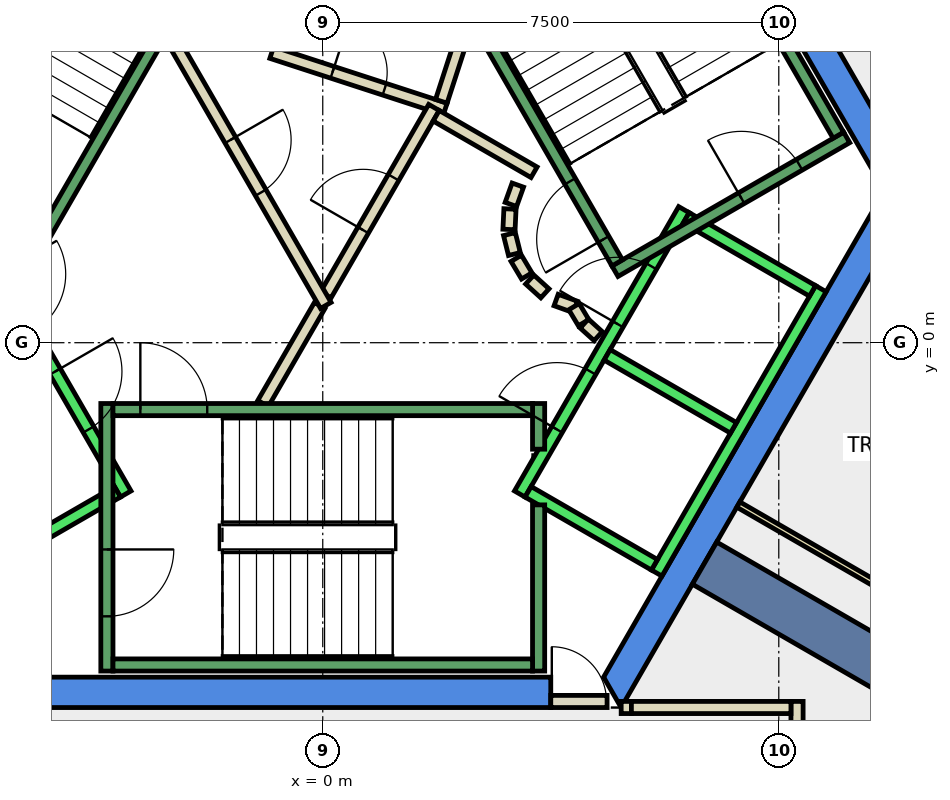
"""IFC4 building model, lengths in metres.
Left out: names, types, materials, properties, quantities, classifications, styles, units other than length and angle.
Written with IfcOpenShell. Run it as: python <this file> out.ifc"""

import sys

from ifc_helpers import new_model, si_unit, direction, frame, frame_2d, origin, place, context, subcontext, project, spatial, polyline, rectangle, outline, extrude, element, fill, save


model = new_model("IFC4")
c1 = context("Model", 3, precision=1e-05, world=origin(), true_north=direction((0.0, 1.0)))
c2 = subcontext(c1, "Body", "Model", "MODEL_VIEW")
j1 = project(units=[si_unit("LENGTHUNIT", "METRE"), si_unit("PLANEANGLEUNIT", "RADIAN")], contexts=[c1])
p1 = place(None, origin())
s1 = spatial("IfcSite", under=j1, at=p1, CompositionType="ELEMENT")
p2 = place(p1, origin())
s2 = spatial("IfcBuilding", under=s1, at=p2, CompositionType="ELEMENT")
p3 = place(p2, frame((0.0, 0.0, 297.2)))
s3 = spatial("IfcBuildingStorey", under=s2, at=p3, CompositionType="ELEMENT", Elevation=297.2)
p4 = place(p3, frame((0.0, 0.0, -0.34)))
e1 = element("IfcWall", 1, at=p4, inside=s3, PredefinedType="SHEAR", context=c2, shape_type="SweptSolid", body=[
    extrude(outline(polyline([(5.486, 9.998), (5.053, 9.748), (9.238, 2.5), (9.815, 2.5), (5.486, 9.998)])), origin(), (0.0, 0.0, 1.0), 3.6),
])
p5 = place(p3, frame((0.0, 0.0, -0.34)))
e2 = element("IfcWall", 2, at=p5, inside=s3, PredefinedType="SHEAR", context=c2, shape_type="SweptSolid", body=[
    extrude(outline(polyline([(3.75, -6.0), (3.75, -5.5), (-4.619, -5.5), (-4.907, -6.0), (3.75, -6.0)])), origin(), (0.0, 0.0, 1.0), 3.6),
])
p6 = place(p3, frame((0.0, 0.0, -0.34)))
e3 = element("IfcWall", 3, at=p6, inside=s3, PredefinedType="SHEAR", context=c2, shape_type="SweptSolid", body=[
    extrude(outline(polyline([(4.907, -6.0), (9.815, 2.5), (9.238, 2.5), (4.619, -5.5), (4.907, -6.0)])), origin(), (0.0, 0.0, 1.0), 3.6),
])
p7 = place(p3, frame((6.279, -3.625, -0.34), z_axis=(0.0, 0.0, 1.0), x_axis=(0.866017533419, -0.500013631625, 0.0)))
e4 = element("IfcWall", 4, at=p7, inside=s3, PredefinedType="SHEAR", context=c2, shape_type="SweptSolid", body=[
    extrude(rectangle(XDim=9.0, YDim=0.8, at=frame_2d((4.5, 0.0))), origin(), (0.0, 0.0, 1.0), 3.6),
])
p8 = place(p3, frame((-0.839, 4.771, 0.0), z_axis=(0.0, 0.0, 1.0), x_axis=(0.950961084355, -0.309310549515, 0.0)))
e5 = element("IfcWall", 5, at=p8, inside=s3, PredefinedType="PARTITIONING", context=c2, shape_type="SweptSolid", body=[
    extrude(rectangle(XDim=3.0, YDim=0.2, at=frame_2d((1.5, 0.0))), origin(), (0.0, 0.0, 1.0), 3.26),
])
p9 = place(p8, frame((1.05, 0.0, 0.0)))
e6 = element("IfcOpeningElement", 6, at=p9, cuts=e5, PredefinedType="OPENING", context=c2, shape_type="SweptSolid", body=[
    extrude(rectangle(XDim=0.9, YDim=2.1, at=frame_2d((0.45, 1.05))), frame((0.0, 0.11, 0.0), z_axis=(0.0, -1.0, 0.0), x_axis=(1.0, 0.0, 0.0)), (0.0, 0.0, 1.0), 0.22),
])
p10 = place(p3, frame((1.95, 3.97, 0.0), z_axis=(0.0, 0.0, 1.0), x_axis=(0.308583003896, 0.951197418892, 0.0)))
e7 = element("IfcWall", 7, at=p10, inside=s3, PredefinedType="PARTITIONING", context=c2, shape_type="SweptSolid", body=[
    extrude(rectangle(XDim=1.449, YDim=0.2, at=frame_2d((0.724, 0.0))), origin(), (0.0, 0.0, 1.0), 3.26),
])
p11 = place(p3, frame((-0.982, -1.0, 0.0), z_axis=(0.0, 0.0, 1.0), x_axis=(0.50024047865, 0.865886518847, 0.0)))
e8 = element("IfcWall", 8, at=p11, inside=s3, PredefinedType="PARTITIONING", context=c2, shape_type="SweptSolid", body=[
    extrude(rectangle(XDim=1.863, YDim=0.2, at=frame_2d((0.931, 0.0))), origin(), (0.0, 0.0, 1.0), 3.26),
])
p12 = place(p3, frame((0.05, 0.787, 0.0), z_axis=(0.0, 0.0, 1.0), x_axis=(0.499954076797, 0.866051915934, 0.0)))
e9 = element("IfcWall", 9, at=p12, inside=s3, PredefinedType="PARTITIONING", context=c2, shape_type="SweptSolid", body=[
    extrude(rectangle(XDim=3.558, YDim=0.2, at=frame_2d((1.779, 0.0))), origin(), (0.0, 0.0, 1.0), 3.26),
])
p13 = place(p12, frame((1.229, 0.0, 0.0)))
e10 = element("IfcOpeningElement", 10, at=p13, cuts=e9, PredefinedType="OPENING", context=c2, shape_type="SweptSolid", body=[
    extrude(rectangle(XDim=1.0, YDim=2.1, at=frame_2d((0.5, 1.05))), frame((0.0, 0.11, 0.0), z_axis=(0.0, -1.0, 0.0), x_axis=(1.0, 0.0, 0.0)), (0.0, 0.0, 1.0), 0.22),
])
p14 = place(p3, frame((1.866, 3.732, 0.0), z_axis=(0.0, 0.0, 1.0), x_axis=(0.866043361281, -0.499968895414, 0.0)))
e11 = element("IfcWall", 11, at=p14, inside=s3, PredefinedType="PARTITIONING", context=c2, shape_type="SweptSolid", body=[
    extrude(rectangle(XDim=1.858, YDim=0.2, at=frame_2d((0.929, 0.0))), origin(), (0.0, 0.0, 1.0), 3.26),
])
p15 = place(p3, frame((3.208, 2.592, 0.0), z_axis=(0.0, 0.0, 1.0), x_axis=(-0.337388820924, -0.941365382578, 0.0)))
e12 = element("IfcWall", 12, at=p15, inside=s3, PredefinedType="PARTITIONING", context=c2, shape_type="SweptSolid", body=[
    extrude(rectangle(XDim=0.338, YDim=0.2, at=frame_2d((0.169, 0.0))), origin(), (0.0, 0.0, 1.0), 3.26),
])
p16 = place(p3, frame((3.079, 2.199, 0.0), z_axis=(0.0, 0.0, 1.0), x_axis=(-0.047771483479, -0.998858290933, 0.0)))
e13 = element("IfcWall", 13, at=p16, inside=s3, PredefinedType="PARTITIONING", context=c2, shape_type="SweptSolid", body=[
    extrude(rectangle(XDim=0.337, YDim=0.2, at=frame_2d((0.169, 0.0))), origin(), (0.0, 0.0, 1.0), 3.26),
])
p17 = place(p3, frame((3.07, 1.786, 0.0), z_axis=(0.0, 0.0, 1.0), x_axis=(0.242705583207, -0.970099994784, 0.0)))
e14 = element("IfcWall", 14, at=p17, inside=s3, PredefinedType="PARTITIONING", context=c2, shape_type="SweptSolid", body=[
    extrude(rectangle(XDim=0.338, YDim=0.2, at=frame_2d((0.169, 0.0))), origin(), (0.0, 0.0, 1.0), 3.26),
])
for number, where, z_axis, x_axis in (
    (15, (3.182, 1.388, 0.0), (0.0, 0.0, 1.0), (0.512, -0.859, 0.0)),
    (16, (3.404, 1.039, 0.0), (0.0, 0.0, 1.0), (0.74, -0.672, 0.0)),
):
    element("IfcWall", number, at=place(p3, frame(where, z_axis=z_axis, x_axis=x_axis)), inside=s3, PredefinedType="PARTITIONING", context=c2, shape_type="SweptSolid", body=[
        extrude(rectangle(XDim=0.338, YDim=0.2, at=frame_2d((0.169, 0.0))), origin(), (0.0, 0.0, 1.0), 3.26),
    ])
p18 = place(p3, frame((3.838, 0.702, 0.0), z_axis=(0.0, 0.0, 1.0), x_axis=(0.941035081519, -0.338308993895, 0.0)))
e17 = element("IfcWall", 17, at=p18, inside=s3, PredefinedType="PARTITIONING", context=c2, shape_type="SweptSolid", body=[
    extrude(rectangle(XDim=0.337, YDim=0.2, at=frame_2d((0.168, 0.0))), origin(), (0.0, 0.0, 1.0), 3.26),
])
p19 = place(p3, frame((4.132, 0.593, 0.0), z_axis=(0.0, 0.0, 1.0), x_axis=(0.513561617048, -0.858052717201, 0.0)))
e18 = element("IfcWall", 18, at=p19, inside=s3, PredefinedType="PARTITIONING", context=c2, shape_type="SweptSolid", body=[
    extrude(rectangle(XDim=0.308, YDim=0.2, at=frame_2d((0.154, 0.0))), origin(), (0.0, 0.0, 1.0), 3.26),
])
p20 = place(p3, frame((4.301, 0.315, 0.0), z_axis=(0.0, 0.0, 1.0), x_axis=(0.741798017506, -0.670623367639, 0.0)))
e19 = element("IfcWall", 19, at=p20, inside=s3, PredefinedType="PARTITIONING", context=c2, shape_type="SweptSolid", body=[
    extrude(rectangle(XDim=0.309, YDim=0.2, at=frame_2d((0.154, 0.0))), origin(), (0.0, 0.0, 1.0), 3.26),
])
p21 = place(p3, frame((-2.54, 5.1, 0.0), z_axis=(0.0, 0.0, 1.0), x_axis=(0.499925051871, -0.866068670783, 0.0)))
e20 = element("IfcWall", 20, at=p21, inside=s3, PredefinedType="PARTITIONING", context=c2, shape_type="SweptSolid", body=[
    extrude(rectangle(XDim=5.181, YDim=0.2, at=frame_2d((2.59, 0.0))), origin(), (0.0, 0.0, 1.0), 3.26),
])
p22 = place(p21, frame((2.04, 0.0, 0.0)))
e21 = element("IfcOpeningElement", 21, at=p22, cuts=e20, PredefinedType="OPENING", context=c2, shape_type="SweptSolid", body=[
    extrude(rectangle(XDim=1.0, YDim=2.1, at=frame_2d((0.5, 1.05))), frame((0.0, 0.11, 0.0), z_axis=(0.0, -1.0, 0.0), x_axis=(1.0, 0.0, 0.0)), (0.0, 0.0, 1.0), 0.22),
])
p23 = place(p3, frame((4.908, -5.999, 0.0), z_axis=(0.0, 0.0, 1.0), x_axis=(1.0, 0.0, 0.0)))
e22 = element("IfcWall", 22, at=p23, inside=s3, PredefinedType="PARTITIONING", context=c2, shape_type="SweptSolid", body=[
    extrude(rectangle(XDim=0.168, YDim=0.2, at=frame_2d((0.084, 0.0))), origin(), (0.0, 0.0, 1.0), 2.4),
])
p24 = place(p3, frame((7.8, -5.899, 0.0), z_axis=(0.0, 0.0, 1.0), x_axis=(0.0, -1.0, 0.0)))
e23 = element("IfcWall", 23, at=p24, inside=s3, PredefinedType="PARTITIONING", context=c2, shape_type="SweptSolid", body=[
    extrude(rectangle(XDim=4.66, YDim=0.2, at=frame_2d((2.33, 0.0))), origin(), (0.0, 0.0, 1.0), 3.26),
])
p25 = place(p3, frame((6.835, -2.662, 0.0), z_axis=(0.0, 0.0, 1.0), x_axis=(0.866023427642, -0.500003422764, 0.0)))
e24 = element("IfcWall", 24, at=p25, inside=s3, PredefinedType="PARTITIONING", context=c2, shape_type="SweptSolid", body=[
    extrude(rectangle(XDim=8.65, YDim=0.1, at=frame_2d((4.325, 0.0))), origin(), (0.0, 0.0, 1.0), 3.26),
])
p26 = place(p3, frame((3.75, -5.9, 0.0), z_axis=(0.0, 0.0, 1.0), x_axis=(1.0, 0.0, 0.0)))
e25 = element("IfcWall", 25, at=p26, inside=s3, PredefinedType="PARTITIONING", context=c2, shape_type="SweptSolid", body=[
    extrude(rectangle(XDim=0.926, YDim=0.2, at=frame_2d((0.463, 0.0))), origin(), (0.0, 0.0, 1.0), 2.4),
])
p27 = place(p26, frame((0.017, 0.0, 0.0)))
e26 = element("IfcOpeningElement", 26, at=p27, cuts=e25, PredefinedType="OPENING", context=c2, shape_type="SweptSolid", body=[
    extrude(rectangle(XDim=0.9, YDim=2.1, at=frame_2d((0.45, 1.05))), frame((0.0, 0.11, 0.0), z_axis=(0.0, -1.0, 0.0), x_axis=(1.0, 0.0, 0.0)), (0.0, 0.0, 1.0), 0.22),
])
p28 = place(p3, frame((5.076, -5.999, 0.0), z_axis=(0.0, 0.0, 1.0), x_axis=(1.0, 0.0, 0.0)))
e27 = element("IfcWall", 27, at=p28, inside=s3, PredefinedType="PARTITIONING", context=c2, shape_type="SweptSolid", body=[
    extrude(rectangle(XDim=2.624, YDim=0.2, at=frame_2d((1.312, 0.0))), origin(), (0.0, 0.0, 1.0), 3.26),
])
p29 = place(p3, frame((-5.94, 2.188, 0.0), z_axis=(0.0, 0.0, 1.0), x_axis=(0.500034260056, -0.866005622828, 0.0)))
e28 = element("IfcWall", 28, at=p29, inside=s3, PredefinedType="STANDARD", context=c2, shape_type="SweptSolid", body=[
    extrude(rectangle(XDim=5.399, YDim=0.2, at=frame_2d((2.7, 0.0))), origin(), (0.0, 0.0, 1.0), 3.26),
])
p30 = place(p29, frame((3.075, 0.0, 0.0)))
e29 = element("IfcOpeningElement", 29, at=p30, cuts=e28, PredefinedType="OPENING", context=c2, shape_type="SweptSolid", body=[
    extrude(rectangle(XDim=1.1, YDim=2.1, at=frame_2d((0.55, 1.05))), frame((0.0, 0.11, 0.0), z_axis=(0.0, -1.0, 0.0), x_axis=(1.0, 0.0, 0.0)), (0.0, 0.0, 1.0), 0.22),
])
p31 = place(p29, frame((1.225, 0.0, 0.0)))
e30 = element("IfcOpeningElement", 30, at=p31, cuts=e28, PredefinedType="OPENING", context=c2, shape_type="SweptSolid", body=[
    extrude(rectangle(XDim=1.1, YDim=2.1, at=frame_2d((0.55, 1.05))), frame((0.0, 0.11, 0.0), z_axis=(0.0, -1.0, 0.0), x_axis=(1.0, 0.0, 0.0)), (0.0, 0.0, 1.0), 0.22),
])
p32 = place(p3, frame((-3.377, -2.452, 0.0), z_axis=(0.0, 0.0, 1.0), x_axis=(-0.865955154139, -0.50012165622, 0.0)))
e31 = element("IfcWall", 31, at=p32, inside=s3, PredefinedType="STANDARD", context=c2, shape_type="SweptSolid", body=[
    extrude(rectangle(XDim=2.4, YDim=0.2, at=frame_2d((1.2, 0.0))), origin(), (0.0, 0.0, 1.0), 3.26),
])
p33 = place(p3, frame((3.24, -2.488, 0.0), z_axis=(0.0, 0.0, 1.0), x_axis=(0.500034260056, 0.866005622828, 0.0)))
e32 = element("IfcWall", 32, at=p33, inside=s3, PredefinedType="STANDARD", context=c2, shape_type="SweptSolid", body=[
    extrude(rectangle(XDim=5.399, YDim=0.2, at=frame_2d((2.7, 0.0))), origin(), (0.0, 0.0, 1.0), 3.26),
])
p34 = place(p33, frame((3.225, 0.0, 0.0)))
e33 = element("IfcOpeningElement", 33, at=p34, cuts=e32, PredefinedType="OPENING", context=c2, shape_type="SweptSolid", body=[
    extrude(rectangle(XDim=1.1, YDim=2.1, at=frame_2d((0.55, 1.05))), frame((0.0, 0.11, 0.0), z_axis=(0.0, -1.0, 0.0), x_axis=(1.0, 0.0, 0.0)), (0.0, 0.0, 1.0), 0.22),
])
p35 = place(p33, frame((1.225, 0.0, 0.0)))
e34 = element("IfcOpeningElement", 34, at=p35, cuts=e32, PredefinedType="OPENING", context=c2, shape_type="SweptSolid", body=[
    extrude(rectangle(XDim=1.1, YDim=2.1, at=frame_2d((0.55, 1.05))), frame((0.0, 0.11, 0.0), z_axis=(0.0, -1.0, 0.0), x_axis=(1.0, 0.0, 0.0)), (0.0, 0.0, 1.0), 0.22),
])
p36 = place(p3, frame((5.492, -3.788, 0.0), z_axis=(0.0, 0.0, 1.0), x_axis=(0.500034260056, 0.866005622828, 0.0)))
e35 = element("IfcWall", 35, at=p36, inside=s3, PredefinedType="STANDARD", context=c2, shape_type="SweptSolid", body=[
    extrude(rectangle(XDim=5.399, YDim=0.2, at=frame_2d((2.7, 0.0))), origin(), (0.0, 0.0, 1.0), 3.26),
])
p37 = place(p3, frame((3.377, -2.452, 0.0), z_axis=(0.0, 0.0, 1.0), x_axis=(0.865955154139, -0.50012165622, 0.0)))
e36 = element("IfcWall", 36, at=p37, inside=s3, PredefinedType="STANDARD", context=c2, shape_type="SweptSolid", body=[
    extrude(rectangle(XDim=2.4, YDim=0.2, at=frame_2d((1.2, 0.0))), origin(), (0.0, 0.0, 1.0), 3.26),
])
for number, where, z_axis, x_axis in (
    (37, (4.677, -0.2, 0.0), (0.0, 0.0, 1.0), (0.866, -0.5, 0.0)),
    (38, (5.977, 2.052, 0.0), (0.0, 0.0, 1.0), (0.866, -0.5, 0.0)),
):
    element("IfcWall", number, at=place(p3, frame(where, z_axis=z_axis, x_axis=x_axis)), inside=s3, PredefinedType="STANDARD", context=c2, shape_type="SweptSolid", body=[
        extrude(rectangle(XDim=2.399, YDim=0.2, at=frame_2d((1.2, 0.0))), origin(), (0.0, 0.0, 1.0), 3.26),
    ])
p38 = place(p3, frame((-3.55, -1.0, 0.0), z_axis=(0.0, 0.0, 1.0), x_axis=(0.0, -1.0, 0.0)))
e39 = element("IfcWall", 39, at=p38, inside=s3, PredefinedType="STANDARD", context=c2, shape_type="SweptSolid", body=[
    extrude(rectangle(XDim=4.4, YDim=0.2, at=frame_2d((2.2, 0.0))), origin(), (0.0, 0.0, 1.0), 3.26),
])
p39 = place(p38, frame((2.4, 0.0, 0.0)))
e40 = element("IfcOpeningElement", 40, at=p39, cuts=e39, PredefinedType="OPENING", context=c2, shape_type="SweptSolid", body=[
    extrude(rectangle(XDim=1.1, YDim=2.2, at=frame_2d((0.55, 1.1))), frame((0.0, 0.11, 0.0), z_axis=(0.0, -1.0, 0.0), x_axis=(1.0, 0.0, 0.0)), (0.0, 0.0, 1.0), 0.22),
])
p40 = place(p3, frame((3.55, -2.667, 0.0), z_axis=(0.0, 0.0, 1.0), x_axis=(0.0, -1.0, 0.0)))
e41 = element("IfcWall", 41, at=p40, inside=s3, PredefinedType="STANDARD", context=c2, shape_type="SweptSolid", body=[
    extrude(rectangle(XDim=2.733, YDim=0.2, at=frame_2d((1.366, 0.0))), origin(), (0.0, 0.0, 1.0), 3.26),
])
p41 = place(p3, frame((3.55, -1.0, 0.0), z_axis=(0.0, 0.0, 1.0), x_axis=(0.0, -1.0, 0.0)))
e42 = element("IfcWall", 42, at=p41, inside=s3, PredefinedType="STANDARD", context=c2, shape_type="SweptSolid", body=[
    extrude(rectangle(XDim=0.751, YDim=0.2, at=frame_2d((0.375, 0.0))), origin(), (0.0, 0.0, 1.0), 3.26),
])
p42 = place(p3, frame((-3.45, -1.1, 0.0), z_axis=(0.0, 0.0, 1.0), x_axis=(1.0, 0.0, 0.0)))
e43 = element("IfcWall", 43, at=p42, inside=s3, PredefinedType="STANDARD", context=c2, shape_type="SweptSolid", body=[
    extrude(rectangle(XDim=6.9, YDim=0.2, at=frame_2d((3.45, 0.0))), origin(), (0.0, 0.0, 1.0), 3.26),
])
p43 = place(p42, frame((0.45, 0.0, 0.0)))
e44 = element("IfcOpeningElement", 44, at=p43, cuts=e43, PredefinedType="OPENING", context=c2, shape_type="SweptSolid", body=[
    extrude(rectangle(XDim=1.1, YDim=2.2, at=frame_2d((0.55, 1.1))), frame((0.0, 0.11, 0.0), z_axis=(0.0, -1.0, 0.0), x_axis=(1.0, 0.0, 0.0)), (0.0, 0.0, 1.0), 0.22),
])
p44 = place(p3, frame((-3.45, -5.3, 0.0), z_axis=(0.0, 0.0, 1.0), x_axis=(1.0, 0.0, 0.0)))
e45 = element("IfcWall", 45, at=p44, inside=s3, PredefinedType="STANDARD", context=c2, shape_type="SweptSolid", body=[
    extrude(rectangle(XDim=6.9, YDim=0.2, at=frame_2d((3.45, 0.0))), origin(), (0.0, 0.0, 1.0), 3.26),
])
p45 = place(p3, frame((4.806, 1.176, 0.0), z_axis=(0.0, 0.0, 1.0), x_axis=(0.866059941101, 0.499940174841, 0.0)))
e46 = element("IfcWall", 46, at=p45, inside=s3, PredefinedType="STANDARD", context=c2, shape_type="SweptSolid", body=[
    extrude(rectangle(XDim=4.4, YDim=0.2, at=frame_2d((2.2, 0.0))), origin(), (0.0, 0.0, 1.0), 3.26),
])
p46 = place(p45, frame((2.4, 0.0, 0.0)))
e47 = element("IfcOpeningElement", 47, at=p46, cuts=e46, PredefinedType="OPENING", context=c2, shape_type="SweptSolid", body=[
    extrude(rectangle(XDim=1.1, YDim=2.2, at=frame_2d((0.55, 1.1))), frame((0.0, 0.11, 0.0), z_axis=(0.0, -1.0, 0.0), x_axis=(1.0, 0.0, 0.0)), (0.0, 0.0, 1.0), 0.22),
])
p47 = place(p3, frame((4.843, 1.312, 0.0), z_axis=(0.0, 0.0, 1.0), x_axis=(-0.499963383562, 0.866046543262, 0.0)))
e48 = element("IfcWall", 48, at=p47, inside=s3, PredefinedType="STANDARD", context=c2, shape_type="SweptSolid", body=[
    extrude(rectangle(XDim=6.9, YDim=0.2, at=frame_2d((3.45, 0.0))), origin(), (0.0, 0.0, 1.0), 3.26),
])
p48 = place(p47, frame((0.45, 0.0, 0.0)))
e49 = element("IfcOpeningElement", 49, at=p48, cuts=e48, PredefinedType="OPENING", context=c2, shape_type="SweptSolid", body=[
    extrude(rectangle(XDim=1.1, YDim=2.2, at=frame_2d((0.55, 1.1))), frame((0.0, 0.11, 0.0), z_axis=(0.0, -1.0, 0.0), x_axis=(1.0, 0.0, 0.0)), (0.0, 0.0, 1.0), 0.22),
])
p49 = place(p3, frame((8.48, 3.412, 0.0), z_axis=(0.0, 0.0, 1.0), x_axis=(-0.499978703459, 0.866037698999, 0.0)))
e50 = element("IfcWall", 50, at=p49, inside=s3, PredefinedType="STANDARD", context=c2, shape_type="SweptSolid", body=[
    extrude(rectangle(XDim=6.9, YDim=0.2, at=frame_2d((3.45, 0.0))), origin(), (0.0, 0.0, 1.0), 3.26),
])
p50 = place(p3, frame((-1.393, 7.288, 0.0), z_axis=(0.0, 0.0, 1.0), x_axis=(-0.499963383562, -0.866046543262, 0.0)))
e51 = element("IfcWall", 51, at=p50, inside=s3, PredefinedType="STANDARD", context=c2, shape_type="SweptSolid", body=[
    extrude(rectangle(XDim=6.9, YDim=0.2, at=frame_2d((3.45, 0.0))), origin(), (0.0, 0.0, 1.0), 3.26),
])
p51 = place(p50, frame((0.45, 0.0, 0.0)))
e52 = element("IfcOpeningElement", 52, at=p51, cuts=e51, PredefinedType="OPENING", context=c2, shape_type="SweptSolid", body=[
    extrude(rectangle(XDim=1.1, YDim=2.2, at=frame_2d((0.55, 1.1))), frame((0.0, 0.11, 0.0), z_axis=(0.0, -1.0, 0.0), x_axis=(1.0, 0.0, 0.0)), (0.0, 0.0, 1.0), 0.22),
])
p52 = place(p13, origin())
e53 = element("IfcDoor", 53, at=p52, inside=s3, OperationType="SINGLE_SWING_RIGHT", PredefinedType="DOOR", context=c2, shape_type="SweptSolid", body=[
    extrude(rectangle(XDim=1.0, YDim=2.1, at=frame_2d((0.5, 1.05))), frame((0.0, 0.025, 0.0), z_axis=(0.0, -1.0, 0.0), x_axis=(1.0, 0.0, 0.0)), (0.0, 0.0, 1.0), 0.05),
])
fill(e10, e53)
p53 = place(p22, origin())
e54 = element("IfcDoor", 54, at=p53, inside=s3, OperationType="SINGLE_SWING_RIGHT", PredefinedType="DOOR", context=c2, shape_type="SweptSolid", body=[
    extrude(rectangle(XDim=1.0, YDim=2.1, at=frame_2d((0.5, 1.05))), frame((0.0, 0.025, 0.0), z_axis=(0.0, -1.0, 0.0), x_axis=(1.0, 0.0, 0.0)), (0.0, 0.0, 1.0), 0.05),
])
fill(e21, e54)
p54 = place(p9, origin())
e55 = element("IfcDoor", 55, at=p54, inside=s3, OperationType="SINGLE_SWING_LEFT", PredefinedType="DOOR", context=c2, shape_type="SweptSolid", body=[
    extrude(rectangle(XDim=0.9, YDim=2.1, at=frame_2d((0.45, 1.05))), frame((0.0, 0.025, 0.0), z_axis=(0.0, -1.0, 0.0), x_axis=(1.0, 0.0, 0.0)), (0.0, 0.0, 1.0), 0.05),
])
fill(e6, e55)
p55 = place(p27, origin())
e56 = element("IfcDoor", 56, at=p55, inside=s3, OperationType="SINGLE_SWING_LEFT", PredefinedType="DOOR", context=c2, shape_type="SweptSolid", body=[
    extrude(rectangle(XDim=0.9, YDim=2.1, at=frame_2d((0.45, 1.05))), frame((0.0, 0.025, 0.0), z_axis=(0.0, -1.0, 0.0), x_axis=(1.0, 0.0, 0.0)), (0.0, 0.0, 1.0), 0.05),
])
fill(e26, e56)
p56 = place(p34, origin())
e57 = element("IfcDoor", 57, at=p56, inside=s3, OperationType="SLIDING_TO_LEFT", PredefinedType="DOOR", context=c2, shape_type="SweptSolid", body=[
    extrude(rectangle(XDim=1.1, YDim=2.1, at=frame_2d((0.55, 1.05))), frame((0.0, 0.025, 0.0), z_axis=(0.0, -1.0, 0.0), x_axis=(1.0, 0.0, 0.0)), (0.0, 0.0, 1.0), 0.05),
])
fill(e33, e57)
p57 = place(p30, origin())
e58 = element("IfcDoor", 58, at=p57, inside=s3, OperationType="SLIDING_TO_LEFT", PredefinedType="DOOR", context=c2, shape_type="SweptSolid", body=[
    extrude(rectangle(XDim=1.1, YDim=2.1, at=frame_2d((0.55, 1.05))), frame((0.0, 0.025, 0.0), z_axis=(0.0, -1.0, 0.0), x_axis=(1.0, 0.0, 0.0)), (0.0, 0.0, 1.0), 0.05),
])
fill(e29, e58)
p58 = place(p35, origin())
e59 = element("IfcDoor", 59, at=p58, inside=s3, OperationType="SLIDING_TO_LEFT", PredefinedType="DOOR", context=c2, shape_type="SweptSolid", body=[
    extrude(rectangle(XDim=1.1, YDim=2.1, at=frame_2d((0.55, 1.05))), frame((0.0, 0.025, 0.0), z_axis=(0.0, -1.0, 0.0), x_axis=(1.0, 0.0, 0.0)), (0.0, 0.0, 1.0), 0.05),
])
fill(e34, e59)
p59 = place(p43, origin())
e60 = element("IfcDoor", 60, at=p59, inside=s3, OperationType="SINGLE_SWING_LEFT", PredefinedType="DOOR", context=c2, shape_type="SweptSolid", body=[
    extrude(rectangle(XDim=1.1, YDim=2.2, at=frame_2d((0.55, 1.1))), frame((0.0, 0.025, 0.0), z_axis=(0.0, -1.0, 0.0), x_axis=(1.0, 0.0, 0.0)), (0.0, 0.0, 1.0), 0.05),
])
fill(e44, e60)
p60 = place(p39, origin())
e61 = element("IfcDoor", 61, at=p60, inside=s3, OperationType="SINGLE_SWING_LEFT", PredefinedType="DOOR", context=c2, shape_type="SweptSolid", body=[
    extrude(rectangle(XDim=1.1, YDim=2.2, at=frame_2d((0.55, 1.1))), frame((0.0, 0.025, 0.0), z_axis=(0.0, -1.0, 0.0), x_axis=(1.0, 0.0, 0.0)), (0.0, 0.0, 1.0), 0.05),
])
fill(e40, e61)
p61 = place(p48, origin())
e62 = element("IfcDoor", 62, at=p61, inside=s3, OperationType="SINGLE_SWING_LEFT", PredefinedType="DOOR", context=c2, shape_type="SweptSolid", body=[
    extrude(rectangle(XDim=1.1, YDim=2.2, at=frame_2d((0.55, 1.1))), frame((0.0, 0.025, 0.0), z_axis=(0.0, -1.0, 0.0), x_axis=(1.0, 0.0, 0.0)), (0.0, 0.0, 1.0), 0.05),
])
fill(e49, e62)
p62 = place(p46, origin())
e63 = element("IfcDoor", 63, at=p62, inside=s3, OperationType="SINGLE_SWING_LEFT", PredefinedType="DOOR", context=c2, shape_type="SweptSolid", body=[
    extrude(rectangle(XDim=1.1, YDim=2.2, at=frame_2d((0.55, 1.1))), frame((0.0, 0.025, 0.0), z_axis=(0.0, -1.0, 0.0), x_axis=(1.0, 0.0, 0.0)), (0.0, 0.0, 1.0), 0.05),
])
fill(e47, e63)
save(model, sys.argv[1])
